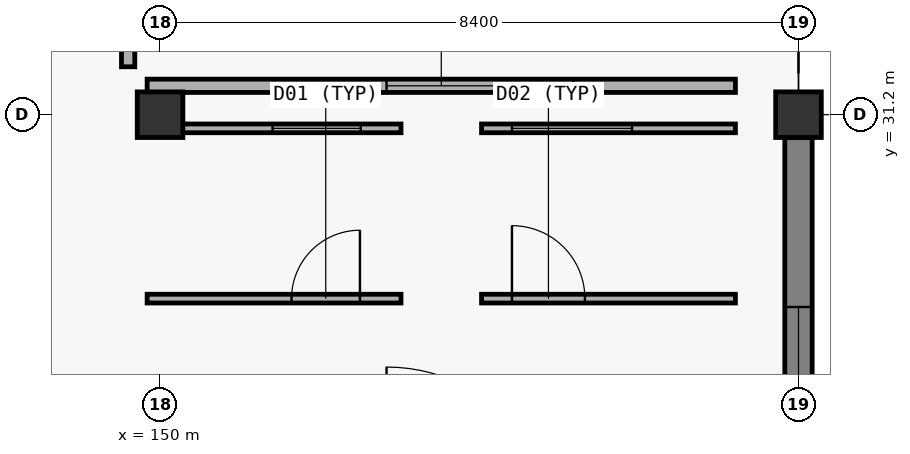
"""IFC4 building model, lengths in metres.
Left out: names, types, materials, properties, quantities, classifications, styles, units other than length and angle.
Written with IfcOpenShell. Run it as: python <this file> out.ifc"""

import sys

from ifc_helpers import new_model, si_unit, direction, frame, frame_2d, origin, origin_2d, place, context, subcontext, project, spatial, rectangle, extrude, element, fill, save


model = new_model("IFC4")
c1 = context("Model", 3, precision=1e-05, world=origin(), true_north=direction((0.0, 1.0)))
c2 = subcontext(c1, "Body", "Model", "MODEL_VIEW")
j1 = project(units=[si_unit("LENGTHUNIT", "METRE"), si_unit("PLANEANGLEUNIT", "RADIAN")], contexts=[c1])
p1 = place(None, origin())
s1 = spatial("IfcSite", under=j1, at=p1, CompositionType="ELEMENT")
p2 = place(p1, origin())
s2 = spatial("IfcBuilding", under=s1, at=p2, CompositionType="ELEMENT")
p3 = place(p2, frame((0.0, 0.0, 26.4)))
s3 = spatial("IfcBuildingStorey", under=s2, at=p3, CompositionType="ELEMENT", Elevation=26.4)
for number, where, z_axis, x_axis in (
    (1, (150.0, 31.2, 0.0), (0.0, 0.0, 1.0), (1.0, 0.0, 0.0)),
    (2, (158.4, 31.2, 0.0), (0.0, 0.0, 1.0), (1.0, 0.0, 0.0)),
):
    element("IfcColumn", number, at=place(p3, frame(where, z_axis=z_axis, x_axis=x_axis)), inside=s3, PredefinedType="COLUMN", context=c2, shape_type="SweptSolid", body=[
        extrude(rectangle(XDim=0.6, YDim=0.6, at=origin_2d()), origin(), (0.0, 0.0, 1.0), 4.5),
    ])
p4 = place(p3, frame((158.4, 21.902, 0.0), z_axis=(0.0, 0.0, 1.0), x_axis=(0.0, 1.0, 0.0)))
e3 = element("IfcWall", 3, at=p4, inside=s3, PredefinedType="SOLIDWALL", context=c2, shape_type="SweptSolid", body=[
    extrude(rectangle(XDim=8.996, YDim=0.36, at=frame_2d((4.498, 0.0))), origin(), (0.0, 0.0, 1.0), 3.74),
])
p5 = place(p4, frame((1.618, 0.0, 0.85)))
e4 = element("IfcOpeningElement", 4, at=p5, cuts=e3, PredefinedType="OPENING", context=c2, shape_type="SweptSolid", body=[
    extrude(rectangle(XDim=2.1, YDim=2.4, at=frame_2d((1.05, 1.2))), frame((0.0, 0.19, 0.0), z_axis=(0.0, -1.0, 0.0), x_axis=(1.0, 0.0, 0.0)), (0.0, 0.0, 1.0), 0.38),
])
p6 = place(p4, frame((4.818, 0.0, 0.85)))
e5 = element("IfcOpeningElement", 5, at=p6, cuts=e3, PredefinedType="OPENING", context=c2, shape_type="SweptSolid", body=[
    extrude(rectangle(XDim=1.95, YDim=2.3, at=frame_2d((0.975, 1.15))), frame((0.0, 0.19, 0.0), z_axis=(0.0, -1.0, 0.0), x_axis=(1.0, 0.0, 0.0)), (0.0, 0.0, 1.0), 0.38),
])
p7 = place(p3, frame((149.58, 31.83, 0.0), z_axis=(0.0, 0.0, 1.0), x_axis=(0.0, 1.0, 0.0)))
e6 = element("IfcWall", 6, at=p7, inside=s3, PredefinedType="PARTITIONING", context=c2, shape_type="SweptSolid", body=[
    extrude(rectangle(XDim=12.74, YDim=0.175, at=frame_2d((6.37, 0.0))), origin(), (0.0, 0.0, 1.0), 3.73),
])
p8 = place(p7, frame((3.4, 0.0, 0.0)))
e7 = element("IfcOpeningElement", 7, at=p8, cuts=e6, PredefinedType="OPENING", context=c2, shape_type="SweptSolid", body=[
    extrude(rectangle(XDim=1.74, YDim=2.48, at=frame_2d((0.87, 1.24))), frame((0.0, 0.097, 0.0), z_axis=(0.0, -1.0, 0.0), x_axis=(1.0, 0.0, 0.0)), (0.0, 0.0, 1.0), 0.195),
])
p9 = place(p3, frame((149.83, 31.58, 0.0), z_axis=(0.0, 0.0, 1.0), x_axis=(1.0, 0.0, 0.0)))
e8 = element("IfcWall", 8, at=p9, inside=s3, PredefinedType="PARTITIONING", context=c2, shape_type="SweptSolid", body=[
    extrude(rectangle(XDim=7.74, YDim=0.175, at=frame_2d((3.87, 0.0))), origin(), (0.0, 0.0, 1.0), 3.74),
])
p10 = place(p9, frame((3.15, 0.0, 0.9)))
e9 = element("IfcOpeningElement", 9, at=p10, cuts=e8, PredefinedType="OPENING", context=c2, shape_type="SweptSolid", body=[
    extrude(rectangle(XDim=2.46, YDim=1.38, at=frame_2d((1.23, 0.69))), frame((0.0, 0.097, 0.0), z_axis=(0.0, -1.0, 0.0), x_axis=(1.0, 0.0, 0.0)), (0.0, 0.0, 1.0), 0.195),
])
p11 = place(p3, frame((149.83, 28.78, 0.0), z_axis=(0.0, 0.0, 1.0), x_axis=(1.0, 0.0, 0.0)))
e10 = element("IfcWall", 10, at=p11, inside=s3, PredefinedType="PARTITIONING", context=c2, shape_type="SweptSolid", body=[
    extrude(rectangle(XDim=3.34, YDim=0.115, at=frame_2d((1.67, 0.0))), origin(), (0.0, 0.0, 1.0), 3.73),
])
p12 = place(p11, frame((1.9, 0.0, 0.0)))
e11 = element("IfcOpeningElement", 11, at=p12, cuts=e10, PredefinedType="OPENING", context=c2, shape_type="SweptSolid", body=[
    extrude(rectangle(XDim=0.9, YDim=2.1, at=frame_2d((0.45, 1.05))), frame((0.0, 0.067, 0.0), z_axis=(0.0, -1.0, 0.0), x_axis=(1.0, 0.0, 0.0)), (0.0, 0.0, 1.0), 0.135),
])
p13 = place(p3, frame((149.83, 31.02, 0.0), z_axis=(0.0, 0.0, 1.0), x_axis=(1.0, 0.0, 0.0)))
e12 = element("IfcWall", 12, at=p13, inside=s3, PredefinedType="PARTITIONING", context=c2, shape_type="SweptSolid", body=[
    extrude(rectangle(XDim=3.34, YDim=0.115, at=frame_2d((1.67, 0.0))), origin(), (0.0, 0.0, 1.0), 3.73),
])
p14 = place(p13, frame((1.65, 0.0, 0.9)))
e13 = element("IfcOpeningElement", 13, at=p14, cuts=e12, PredefinedType="OPENING", context=c2, shape_type="SweptSolid", body=[
    extrude(rectangle(XDim=1.16, YDim=1.62, at=frame_2d((0.58, 0.81))), frame((0.0, 0.067, 0.0), z_axis=(0.0, -1.0, 0.0), x_axis=(1.0, 0.0, 0.0)), (0.0, 0.0, 1.0), 0.135),
])
p15 = place(p3, frame((154.23, 28.78, 0.0), z_axis=(0.0, 0.0, 1.0), x_axis=(1.0, 0.0, 0.0)))
e14 = element("IfcWall", 14, at=p15, inside=s3, PredefinedType="PARTITIONING", context=c2, shape_type="SweptSolid", body=[
    extrude(rectangle(XDim=3.34, YDim=0.115, at=frame_2d((1.67, 0.0))), origin(), (0.0, 0.0, 1.0), 3.91),
])
p16 = place(p15, frame((0.4, 0.0, 0.0)))
e15 = element("IfcOpeningElement", 15, at=p16, cuts=e14, PredefinedType="OPENING", context=c2, shape_type="SweptSolid", body=[
    extrude(rectangle(XDim=0.96, YDim=2.14, at=frame_2d((0.48, 1.07))), frame((0.0, 0.067, 0.0), z_axis=(0.0, -1.0, 0.0), x_axis=(1.0, 0.0, 0.0)), (0.0, 0.0, 1.0), 0.135),
])
p17 = place(p3, frame((154.23, 31.02, 0.0), z_axis=(0.0, 0.0, 1.0), x_axis=(1.0, 0.0, 0.0)))
e16 = element("IfcWall", 16, at=p17, inside=s3, PredefinedType="PARTITIONING", context=c2, shape_type="SweptSolid", body=[
    extrude(rectangle(XDim=3.34, YDim=0.115, at=frame_2d((1.67, 0.0))), origin(), (0.0, 0.0, 1.0), 3.73),
])
p18 = place(p17, frame((0.4, 0.0, 0.9)))
e17 = element("IfcOpeningElement", 17, at=p18, cuts=e16, PredefinedType="OPENING", context=c2, shape_type="SweptSolid", body=[
    extrude(rectangle(XDim=1.58, YDim=1.24, at=frame_2d((0.79, 0.62))), frame((0.0, 0.067, 0.0), z_axis=(0.0, -1.0, 0.0), x_axis=(1.0, 0.0, 0.0)), (0.0, 0.0, 1.0), 0.135),
])
p19 = place(p6, origin())
e18 = element("IfcWindow", 18, at=p19, inside=s3, PartitioningType="SINGLE_PANEL", PredefinedType="WINDOW", context=c2, shape_type="SweptSolid", body=[
    extrude(rectangle(XDim=1.95, YDim=2.3, at=frame_2d((0.975, 1.15))), frame((0.0, 0.03, 0.0), z_axis=(0.0, -1.0, 0.0), x_axis=(1.0, 0.0, 0.0)), (0.0, 0.0, 1.0), 0.06),
])
fill(e5, e18)
p20 = place(p10, origin())
e19 = element("IfcWindow", 19, at=p20, inside=s3, PartitioningType="SINGLE_PANEL", PredefinedType="WINDOW", context=c2, shape_type="SweptSolid", body=[
    extrude(rectangle(XDim=2.46, YDim=1.38, at=frame_2d((1.23, 0.69))), frame((0.0, 0.03, 0.0), z_axis=(0.0, -1.0, 0.0), x_axis=(1.0, 0.0, 0.0)), (0.0, 0.0, 1.0), 0.06),
])
fill(e9, e19)
p21 = place(p12, origin())
e20 = element("IfcDoor", 20, at=p21, inside=s3, OperationType="SINGLE_SWING_RIGHT", PredefinedType="DOOR", context=c2, shape_type="SweptSolid", body=[
    extrude(rectangle(XDim=0.9, YDim=2.1, at=frame_2d((0.45, 1.05))), frame((0.0, 0.025, 0.0), z_axis=(0.0, -1.0, 0.0), x_axis=(1.0, 0.0, 0.0)), (0.0, 0.0, 1.0), 0.05),
])
fill(e11, e20)
p22 = place(p14, origin())
e21 = element("IfcWindow", 21, at=p22, inside=s3, PartitioningType="SINGLE_PANEL", PredefinedType="WINDOW", context=c2, shape_type="SweptSolid", body=[
    extrude(rectangle(XDim=1.16, YDim=1.62, at=frame_2d((0.58, 0.81))), frame((0.0, 0.03, 0.0), z_axis=(0.0, -1.0, 0.0), x_axis=(1.0, 0.0, 0.0)), (0.0, 0.0, 1.0), 0.06),
])
fill(e13, e21)
p23 = place(p16, origin())
e22 = element("IfcDoor", 22, at=p23, inside=s3, OperationType="SINGLE_SWING_LEFT", PredefinedType="DOOR", context=c2, shape_type="SweptSolid", body=[
    extrude(rectangle(XDim=0.96, YDim=2.14, at=frame_2d((0.48, 1.07))), frame((0.0, 0.025, 0.0), z_axis=(0.0, -1.0, 0.0), x_axis=(1.0, 0.0, 0.0)), (0.0, 0.0, 1.0), 0.05),
])
fill(e15, e22)
p24 = place(p18, origin())
e23 = element("IfcWindow", 23, at=p24, inside=s3, PartitioningType="SINGLE_PANEL", PredefinedType="WINDOW", context=c2, shape_type="SweptSolid", body=[
    extrude(rectangle(XDim=1.58, YDim=1.24, at=frame_2d((0.79, 0.62))), frame((0.0, 0.03, 0.0), z_axis=(0.0, -1.0, 0.0), x_axis=(1.0, 0.0, 0.0)), (0.0, 0.0, 1.0), 0.06),
])
fill(e17, e23)
save(model, sys.argv[1])
